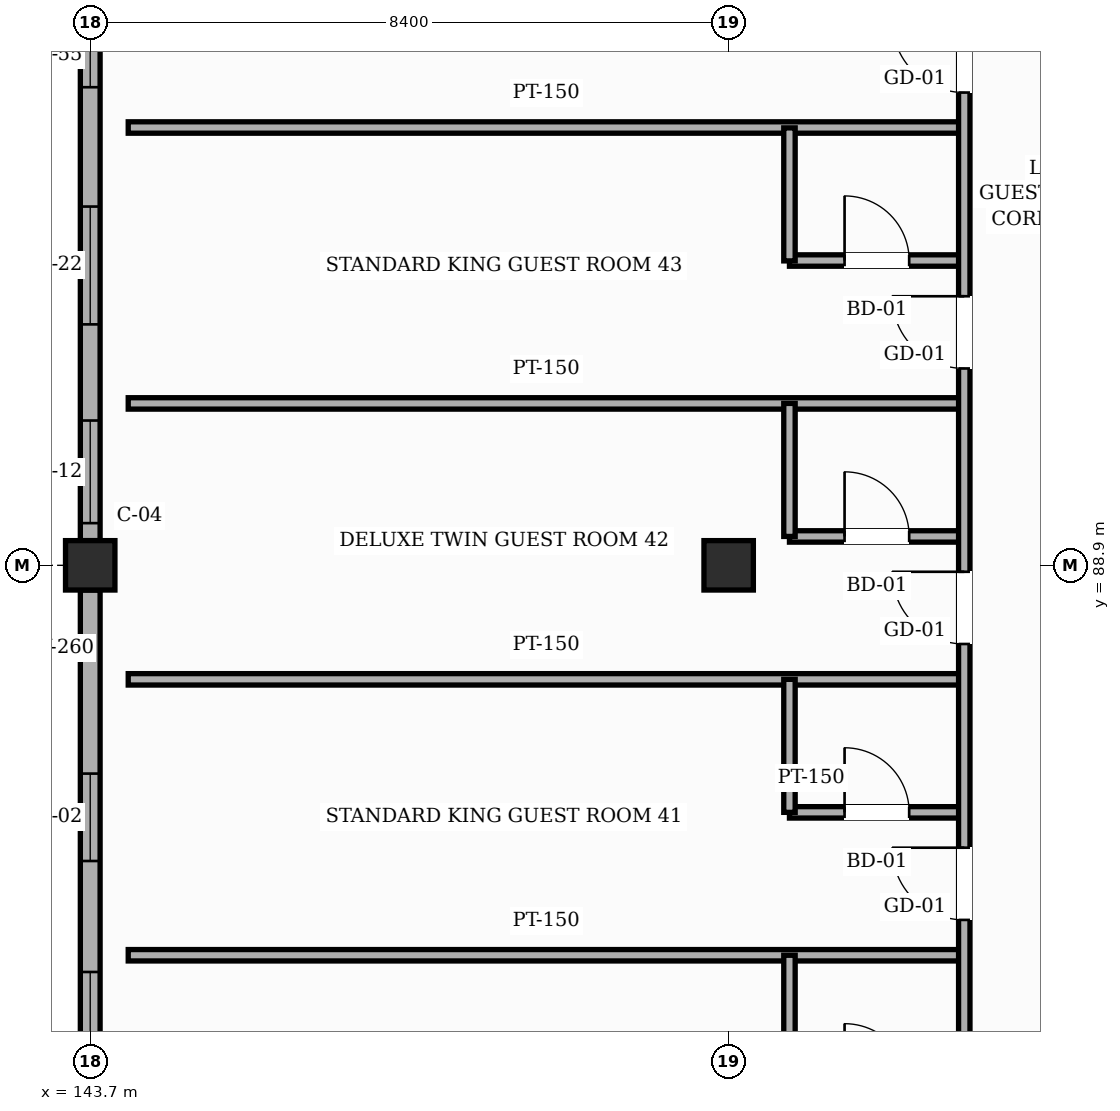
"""IFC4 building model, lengths in metres.
Left out: names, types, materials, properties, quantities, classifications, styles, units other than length and angle.
Written with IfcOpenShell. Run it as: python <this file> out.ifc"""

import sys

from ifc_helpers import new_model, si_unit, direction, frame, frame_2d, origin, origin_2d, place, context, subcontext, project, spatial, rectangle, hollow_rectangle, extrude, element, fill, save


model = new_model("IFC4")
c1 = context("Model", 3, precision=1e-05, world=origin(), true_north=direction((0.0, 1.0)))
c2 = subcontext(c1, "Body", "Model", "MODEL_VIEW")
j1 = project(units=[si_unit("LENGTHUNIT", "METRE"), si_unit("PLANEANGLEUNIT", "RADIAN")], contexts=[c1])
p1 = place(None, origin())
s1 = spatial("IfcSite", under=j1, at=p1, CompositionType="ELEMENT")
p2 = place(p1, origin())
s2 = spatial("IfcBuilding", under=s1, at=p2, CompositionType="ELEMENT")
p3 = place(p2, frame((0.0, 0.0, 19.8)))
s3 = spatial("IfcBuildingStorey", under=s2, at=p3, CompositionType="ELEMENT", Elevation=19.8)
p4 = place(p3, frame((143.7, 88.9, 0.0), z_axis=(0.0, 0.0, 1.0), x_axis=(1.0, 0.0, 0.0)))
e1 = element("IfcColumn", 1, at=p4, inside=s3, PredefinedType="COLUMN", context=c2, shape_type="SweptSolid", body=[
    extrude(hollow_rectangle(XDim=0.65, YDim=0.65, WallThickness=0.025, InnerFilletRadius=0.025, OuterFilletRadius=0.05, at=origin_2d()), origin(), (0.0, 0.0, 1.0), 4.8),
])
p5 = place(p3, frame((152.1, 88.9, -0.24), z_axis=(0.0, 0.0, 1.0), x_axis=(1.0, 0.0, 0.0)))
e2 = element("IfcColumn", 2, at=p5, inside=s3, PredefinedType="COLUMN", context=c2, shape_type="SweptSolid", body=[
    extrude(hollow_rectangle(XDim=0.65, YDim=0.65, WallThickness=0.025, InnerFilletRadius=0.025, OuterFilletRadius=0.05, at=origin_2d()), origin(), (0.0, 0.0, 1.0), 5.04),
])
p6 = place(p3, frame((143.7, 81.225, 0.0), z_axis=(0.0, 0.0, 1.0), x_axis=(0.0, 1.0, 0.0)))
e3 = element("IfcWall", 3, at=p6, inside=s3, PredefinedType="SOLIDWALL", context=c2, shape_type="SweptSolid", body=[
    extrude(rectangle(XDim=7.35, YDim=0.26, at=frame_2d((3.675, 0.0))), origin(), (0.0, 0.0, 1.0), 4.005),
])
p7 = place(p6, frame((0.225, 0.0, 0.85)))
e4 = element("IfcOpeningElement", 4, at=p7, cuts=e3, PredefinedType="OPENING", context=c2, shape_type="SweptSolid", body=[
    extrude(rectangle(XDim=2.1, YDim=1.35, at=frame_2d((1.05, 0.675))), frame((0.0, 0.14, 0.0), z_axis=(0.0, -1.0, 0.0), x_axis=(1.0, 0.0, 0.0)), (0.0, 0.0, 1.0), 0.28),
])
p8 = place(p6, frame((3.785, 0.0, 0.85)))
e5 = element("IfcOpeningElement", 5, at=p8, cuts=e3, PredefinedType="OPENING", context=c2, shape_type="SweptSolid", body=[
    extrude(rectangle(XDim=1.15, YDim=1.5, at=frame_2d((0.575, 0.75))), frame((0.0, 0.14, 0.0), z_axis=(0.0, -1.0, 0.0), x_axis=(1.0, 0.0, 0.0)), (0.0, 0.0, 1.0), 0.28),
])
p9 = place(p3, frame((143.7, 89.225, 0.0), z_axis=(0.0, 0.0, 1.0), x_axis=(0.0, 1.0, 0.0)))
e6 = element("IfcWall", 6, at=p9, inside=s3, PredefinedType="SOLIDWALL", context=c2, shape_type="SweptSolid", body=[
    extrude(rectangle(XDim=7.35, YDim=0.26, at=frame_2d((3.675, 0.0))), origin(), (0.0, 0.0, 1.0), 4.005),
])
p10 = place(p9, frame((0.23, 0.0, 0.85)))
e7 = element("IfcOpeningElement", 7, at=p10, cuts=e6, PredefinedType="OPENING", context=c2, shape_type="SweptSolid", body=[
    extrude(rectangle(XDim=1.35, YDim=1.5, at=frame_2d((0.675, 0.75))), frame((0.0, 0.14, 0.0), z_axis=(0.0, -1.0, 0.0), x_axis=(1.0, 0.0, 0.0)), (0.0, 0.0, 1.0), 0.28),
])
p11 = place(p9, frame((2.845, 0.0, 0.85)))
e8 = element("IfcOpeningElement", 8, at=p11, cuts=e6, PredefinedType="OPENING", context=c2, shape_type="SweptSolid", body=[
    extrude(rectangle(XDim=1.55, YDim=1.5, at=frame_2d((0.775, 0.75))), frame((0.0, 0.14, 0.0), z_axis=(0.0, -1.0, 0.0), x_axis=(1.0, 0.0, 0.0)), (0.0, 0.0, 1.0), 0.28),
])
p12 = place(p9, frame((5.965, 0.0, 0.85)))
e9 = element("IfcOpeningElement", 9, at=p12, cuts=e6, PredefinedType="OPENING", context=c2, shape_type="SweptSolid", body=[
    extrude(rectangle(XDim=0.85, YDim=1.35, at=frame_2d((0.425, 0.675))), frame((0.0, 0.14, 0.0), z_axis=(0.0, -1.0, 0.0), x_axis=(1.0, 0.0, 0.0)), (0.0, 0.0, 1.0), 0.28),
])
p13 = place(p3, frame((144.2, 83.77, 0.0), z_axis=(0.0, 0.0, 1.0), x_axis=(1.0, 0.0, 0.0)))
e10 = element("IfcWall", 10, at=p13, inside=s3, PredefinedType="PARTITIONING", context=c2, shape_type="SweptSolid", body=[
    extrude(rectangle(XDim=11.0, YDim=0.15, at=frame_2d((5.5, 0.0))), origin(), (0.0, 0.0, 1.0), 4.565),
])
p14 = place(p3, frame((152.9, 85.65, 0.0), z_axis=(0.0, 0.0, 1.0), x_axis=(1.0, 0.0, 0.0)))
e11 = element("IfcWall", 11, at=p14, inside=s3, PredefinedType="PARTITIONING", context=c2, shape_type="SweptSolid", body=[
    extrude(rectangle(XDim=2.3, YDim=0.15, at=frame_2d((1.15, 0.0))), origin(), (0.0, 0.0, 1.0), 4.565),
])
p15 = place(p14, frame((0.725, 0.0, 0.0)))
e12 = element("IfcOpeningElement", 12, at=p15, cuts=e11, PredefinedType="OPENING", context=c2, shape_type="SweptSolid", body=[
    extrude(rectangle(XDim=0.85, YDim=2.1, at=frame_2d((0.425, 1.05))), frame((0.0, 0.085, 0.0), z_axis=(0.0, -1.0, 0.0), x_axis=(1.0, 0.0, 0.0)), (0.0, 0.0, 1.0), 0.17),
])
p16 = place(p3, frame((144.2, 87.4, 0.0), z_axis=(0.0, 0.0, 1.0), x_axis=(1.0, 0.0, 0.0)))
e13 = element("IfcWall", 13, at=p16, inside=s3, PredefinedType="PARTITIONING", context=c2, shape_type="SweptSolid", body=[
    extrude(rectangle(XDim=11.0, YDim=0.15, at=frame_2d((5.5, 0.0))), origin(), (0.0, 0.0, 1.0), 4.565),
])
p17 = place(p3, frame((152.9, 89.28, 0.0), z_axis=(0.0, 0.0, 1.0), x_axis=(1.0, 0.0, 0.0)))
e14 = element("IfcWall", 14, at=p17, inside=s3, PredefinedType="PARTITIONING", context=c2, shape_type="SweptSolid", body=[
    extrude(rectangle(XDim=2.3, YDim=0.15, at=frame_2d((1.15, 0.0))), origin(), (0.0, 0.0, 1.0), 4.565),
])
p18 = place(p17, frame((0.725, 0.0, 0.0)))
e15 = element("IfcOpeningElement", 15, at=p18, cuts=e14, PredefinedType="OPENING", context=c2, shape_type="SweptSolid", body=[
    extrude(rectangle(XDim=0.85, YDim=2.1, at=frame_2d((0.425, 1.05))), frame((0.0, 0.085, 0.0), z_axis=(0.0, -1.0, 0.0), x_axis=(1.0, 0.0, 0.0)), (0.0, 0.0, 1.0), 0.17),
])
p19 = place(p3, frame((144.2, 91.03, 0.0), z_axis=(0.0, 0.0, 1.0), x_axis=(1.0, 0.0, 0.0)))
e16 = element("IfcWall", 16, at=p19, inside=s3, PredefinedType="PARTITIONING", context=c2, shape_type="SweptSolid", body=[
    extrude(rectangle(XDim=11.0, YDim=0.15, at=frame_2d((5.5, 0.0))), origin(), (0.0, 0.0, 1.0), 4.565),
])
p20 = place(p3, frame((152.9, 92.91, 0.0), z_axis=(0.0, 0.0, 1.0), x_axis=(1.0, 0.0, 0.0)))
e17 = element("IfcWall", 17, at=p20, inside=s3, PredefinedType="PARTITIONING", context=c2, shape_type="SweptSolid", body=[
    extrude(rectangle(XDim=2.3, YDim=0.15, at=frame_2d((1.15, 0.0))), origin(), (0.0, 0.0, 1.0), 4.205),
])
p21 = place(p20, frame((0.725, 0.0, 0.0)))
e18 = element("IfcOpeningElement", 18, at=p21, cuts=e17, PredefinedType="OPENING", context=c2, shape_type="SweptSolid", body=[
    extrude(rectangle(XDim=0.85, YDim=2.1, at=frame_2d((0.425, 1.05))), frame((0.0, 0.085, 0.0), z_axis=(0.0, -1.0, 0.0), x_axis=(1.0, 0.0, 0.0)), (0.0, 0.0, 1.0), 0.17),
])
p22 = place(p3, frame((144.2, 94.66, 0.0), z_axis=(0.0, 0.0, 1.0), x_axis=(1.0, 0.0, 0.0)))
e19 = element("IfcWall", 19, at=p22, inside=s3, PredefinedType="PARTITIONING", context=c2, shape_type="SweptSolid", body=[
    extrude(rectangle(XDim=11.0, YDim=0.15, at=frame_2d((5.5, 0.0))), origin(), (0.0, 0.0, 1.0), 4.565),
])
for number, where, z_axis, x_axis in (
    (20, (152.9, 82.02, 0.0), (0.0, 0.0, 1.0), (0.0, 1.0, 0.0)),
    (21, (152.9, 85.65, 0.0), (0.0, 0.0, 1.0), (0.0, 1.0, 0.0)),
    (22, (152.9, 89.28, 0.0), (0.0, 0.0, 1.0), (0.0, 1.0, 0.0)),
    (23, (152.9, 92.905, 0.0), (0.0, 0.0, 1.0), (0.0, 1.0, 0.0)),
):
    element("IfcWall", number, at=place(p3, frame(where, z_axis=z_axis, x_axis=x_axis)), inside=s3, PredefinedType="PARTITIONING", context=c2, shape_type="SweptSolid", body=[
        extrude(rectangle(XDim=1.75, YDim=0.15, at=frame_2d((0.875, 0.0))), origin(), (0.0, 0.0, 1.0), 4.565),
    ])
p23 = place(p3, frame((155.2, 62.0, 0.0), z_axis=(0.0, 0.0, 1.0), x_axis=(0.0, 1.0, 0.0)))
e24 = element("IfcWall", 24, at=p23, inside=s3, PredefinedType="PARTITIONING", context=c2, shape_type="SweptSolid", body=[
    extrude(rectangle(XDim=50.8, YDim=0.15, at=frame_2d((25.4, 0.0))), origin(), (0.0, 0.0, 1.0), 4.565),
])
p24 = place(p23, frame((0.465, 0.0, 0.0)))
e25 = element("IfcOpeningElement", 25, at=p24, cuts=e24, PredefinedType="OPENING", context=c2, shape_type="SweptSolid", body=[
    extrude(rectangle(XDim=0.95, YDim=2.15, at=frame_2d((0.475, 1.075))), frame((0.0, 0.085, 0.0), z_axis=(0.0, -1.0, 0.0), x_axis=(1.0, 0.0, 0.0)), (0.0, 0.0, 1.0), 0.17),
])
p25 = place(p23, frame((4.09, 0.0, 0.0)))
e26 = element("IfcOpeningElement", 26, at=p25, cuts=e24, PredefinedType="OPENING", context=c2, shape_type="SweptSolid", body=[
    extrude(rectangle(XDim=0.95, YDim=2.15, at=frame_2d((0.475, 1.075))), frame((0.0, 0.085, 0.0), z_axis=(0.0, -1.0, 0.0), x_axis=(1.0, 0.0, 0.0)), (0.0, 0.0, 1.0), 0.17),
])
p26 = place(p23, frame((7.72, 0.0, 0.0)))
e27 = element("IfcOpeningElement", 27, at=p26, cuts=e24, PredefinedType="OPENING", context=c2, shape_type="SweptSolid", body=[
    extrude(rectangle(XDim=0.95, YDim=2.15, at=frame_2d((0.475, 1.075))), frame((0.0, 0.085, 0.0), z_axis=(0.0, -1.0, 0.0), x_axis=(1.0, 0.0, 0.0)), (0.0, 0.0, 1.0), 0.17),
])
p27 = place(p23, frame((11.35, 0.0, 0.0)))
e28 = element("IfcOpeningElement", 28, at=p27, cuts=e24, PredefinedType="OPENING", context=c2, shape_type="SweptSolid", body=[
    extrude(rectangle(XDim=0.95, YDim=2.15, at=frame_2d((0.475, 1.075))), frame((0.0, 0.085, 0.0), z_axis=(0.0, -1.0, 0.0), x_axis=(1.0, 0.0, 0.0)), (0.0, 0.0, 1.0), 0.17),
])
p28 = place(p23, frame((14.98, 0.0, 0.0)))
e29 = element("IfcOpeningElement", 29, at=p28, cuts=e24, PredefinedType="OPENING", context=c2, shape_type="SweptSolid", body=[
    extrude(rectangle(XDim=0.95, YDim=2.15, at=frame_2d((0.475, 1.075))), frame((0.0, 0.085, 0.0), z_axis=(0.0, -1.0, 0.0), x_axis=(1.0, 0.0, 0.0)), (0.0, 0.0, 1.0), 0.17),
])
p29 = place(p23, frame((18.61, 0.0, 0.0)))
e30 = element("IfcOpeningElement", 30, at=p29, cuts=e24, PredefinedType="OPENING", context=c2, shape_type="SweptSolid", body=[
    extrude(rectangle(XDim=0.95, YDim=2.15, at=frame_2d((0.475, 1.075))), frame((0.0, 0.085, 0.0), z_axis=(0.0, -1.0, 0.0), x_axis=(1.0, 0.0, 0.0)), (0.0, 0.0, 1.0), 0.17),
])
p30 = place(p23, frame((22.235, 0.0, 0.0)))
e31 = element("IfcOpeningElement", 31, at=p30, cuts=e24, PredefinedType="OPENING", context=c2, shape_type="SweptSolid", body=[
    extrude(rectangle(XDim=0.95, YDim=2.15, at=frame_2d((0.475, 1.075))), frame((0.0, 0.085, 0.0), z_axis=(0.0, -1.0, 0.0), x_axis=(1.0, 0.0, 0.0)), (0.0, 0.0, 1.0), 0.17),
])
p31 = place(p23, frame((25.865, 0.0, 0.0)))
e32 = element("IfcOpeningElement", 32, at=p31, cuts=e24, PredefinedType="OPENING", context=c2, shape_type="SweptSolid", body=[
    extrude(rectangle(XDim=0.95, YDim=2.15, at=frame_2d((0.475, 1.075))), frame((0.0, 0.085, 0.0), z_axis=(0.0, -1.0, 0.0), x_axis=(1.0, 0.0, 0.0)), (0.0, 0.0, 1.0), 0.17),
])
p32 = place(p23, frame((29.49, 0.0, 0.0)))
e33 = element("IfcOpeningElement", 33, at=p32, cuts=e24, PredefinedType="OPENING", context=c2, shape_type="SweptSolid", body=[
    extrude(rectangle(XDim=0.95, YDim=2.15, at=frame_2d((0.475, 1.075))), frame((0.0, 0.085, 0.0), z_axis=(0.0, -1.0, 0.0), x_axis=(1.0, 0.0, 0.0)), (0.0, 0.0, 1.0), 0.17),
])
p33 = place(p23, frame((33.12, 0.0, 0.0)))
e34 = element("IfcOpeningElement", 34, at=p33, cuts=e24, PredefinedType="OPENING", context=c2, shape_type="SweptSolid", body=[
    extrude(rectangle(XDim=0.95, YDim=2.15, at=frame_2d((0.475, 1.075))), frame((0.0, 0.085, 0.0), z_axis=(0.0, -1.0, 0.0), x_axis=(1.0, 0.0, 0.0)), (0.0, 0.0, 1.0), 0.17),
])
p34 = place(p23, frame((36.75, 0.0, 0.0)))
e35 = element("IfcOpeningElement", 35, at=p34, cuts=e24, PredefinedType="OPENING", context=c2, shape_type="SweptSolid", body=[
    extrude(rectangle(XDim=0.95, YDim=2.15, at=frame_2d((0.475, 1.075))), frame((0.0, 0.085, 0.0), z_axis=(0.0, -1.0, 0.0), x_axis=(1.0, 0.0, 0.0)), (0.0, 0.0, 1.0), 0.17),
])
p35 = place(p23, frame((40.38, 0.0, 0.0)))
e36 = element("IfcOpeningElement", 36, at=p35, cuts=e24, PredefinedType="OPENING", context=c2, shape_type="SweptSolid", body=[
    extrude(rectangle(XDim=0.95, YDim=2.15, at=frame_2d((0.475, 1.075))), frame((0.0, 0.085, 0.0), z_axis=(0.0, -1.0, 0.0), x_axis=(1.0, 0.0, 0.0)), (0.0, 0.0, 1.0), 0.17),
])
p36 = place(p23, frame((44.01, 0.0, 0.0)))
e37 = element("IfcOpeningElement", 37, at=p36, cuts=e24, PredefinedType="OPENING", context=c2, shape_type="SweptSolid", body=[
    extrude(rectangle(XDim=0.95, YDim=2.15, at=frame_2d((0.475, 1.075))), frame((0.0, 0.085, 0.0), z_axis=(0.0, -1.0, 0.0), x_axis=(1.0, 0.0, 0.0)), (0.0, 0.0, 1.0), 0.17),
])
p37 = place(p23, frame((47.635, 0.0, 0.0)))
e38 = element("IfcOpeningElement", 38, at=p37, cuts=e24, PredefinedType="OPENING", context=c2, shape_type="SweptSolid", body=[
    extrude(rectangle(XDim=0.95, YDim=2.15, at=frame_2d((0.475, 1.075))), frame((0.0, 0.085, 0.0), z_axis=(0.0, -1.0, 0.0), x_axis=(1.0, 0.0, 0.0)), (0.0, 0.0, 1.0), 0.17),
])
p38 = place(p7, origin())
e39 = element("IfcWindow", 39, at=p38, inside=s3, PartitioningType="SINGLE_PANEL", PredefinedType="WINDOW", context=c2, shape_type="SweptSolid", body=[
    extrude(rectangle(XDim=2.1, YDim=1.35, at=frame_2d((1.05, 0.675))), frame((0.0, 0.03, 0.0), z_axis=(0.0, -1.0, 0.0), x_axis=(1.0, 0.0, 0.0)), (0.0, 0.0, 1.0), 0.06),
])
fill(e4, e39)
p39 = place(p8, origin())
e40 = element("IfcWindow", 40, at=p39, inside=s3, PartitioningType="SINGLE_PANEL", PredefinedType="WINDOW", context=c2, shape_type="SweptSolid", body=[
    extrude(rectangle(XDim=1.15, YDim=1.5, at=frame_2d((0.575, 0.75))), frame((0.0, 0.03, 0.0), z_axis=(0.0, -1.0, 0.0), x_axis=(1.0, 0.0, 0.0)), (0.0, 0.0, 1.0), 0.06),
])
fill(e5, e40)
p40 = place(p10, origin())
e41 = element("IfcWindow", 41, at=p40, inside=s3, PartitioningType="SINGLE_PANEL", PredefinedType="WINDOW", context=c2, shape_type="SweptSolid", body=[
    extrude(rectangle(XDim=1.35, YDim=1.5, at=frame_2d((0.675, 0.75))), frame((0.0, 0.03, 0.0), z_axis=(0.0, -1.0, 0.0), x_axis=(1.0, 0.0, 0.0)), (0.0, 0.0, 1.0), 0.06),
])
fill(e7, e41)
p41 = place(p11, origin())
e42 = element("IfcWindow", 42, at=p41, inside=s3, PartitioningType="SINGLE_PANEL", PredefinedType="WINDOW", context=c2, shape_type="SweptSolid", body=[
    extrude(rectangle(XDim=1.55, YDim=1.5, at=frame_2d((0.775, 0.75))), frame((0.0, 0.03, 0.0), z_axis=(0.0, -1.0, 0.0), x_axis=(1.0, 0.0, 0.0)), (0.0, 0.0, 1.0), 0.06),
])
fill(e8, e42)
p42 = place(p12, origin())
e43 = element("IfcWindow", 43, at=p42, inside=s3, PartitioningType="SINGLE_PANEL", PredefinedType="WINDOW", context=c2, shape_type="SweptSolid", body=[
    extrude(rectangle(XDim=0.85, YDim=1.35, at=frame_2d((0.425, 0.675))), frame((0.0, 0.03, 0.0), z_axis=(0.0, -1.0, 0.0), x_axis=(1.0, 0.0, 0.0)), (0.0, 0.0, 1.0), 0.06),
])
fill(e9, e43)
p43 = place(p30, origin())
e44 = element("IfcDoor", 44, at=p43, inside=s3, OperationType="SINGLE_SWING_RIGHT", PredefinedType="DOOR", context=c2, shape_type="SweptSolid", body=[
    extrude(rectangle(XDim=0.95, YDim=2.15, at=frame_2d((0.475, 1.075))), frame((0.0, 0.025, 0.0), z_axis=(0.0, -1.0, 0.0), x_axis=(1.0, 0.0, 0.0)), (0.0, 0.0, 1.0), 0.05),
])
fill(e31, e44)
p44 = place(p15, origin())
e45 = element("IfcDoor", 45, at=p44, inside=s3, OperationType="SINGLE_SWING_LEFT", PredefinedType="DOOR", context=c2, shape_type="SweptSolid", body=[
    extrude(rectangle(XDim=0.85, YDim=2.1, at=frame_2d((0.425, 1.05))), frame((0.0, 0.025, 0.0), z_axis=(0.0, -1.0, 0.0), x_axis=(1.0, 0.0, 0.0)), (0.0, 0.0, 1.0), 0.05),
])
fill(e12, e45)
p45 = place(p31, origin())
e46 = element("IfcDoor", 46, at=p45, inside=s3, OperationType="SINGLE_SWING_RIGHT", PredefinedType="DOOR", context=c2, shape_type="SweptSolid", body=[
    extrude(rectangle(XDim=0.95, YDim=2.15, at=frame_2d((0.475, 1.075))), frame((0.0, 0.025, 0.0), z_axis=(0.0, -1.0, 0.0), x_axis=(1.0, 0.0, 0.0)), (0.0, 0.0, 1.0), 0.05),
])
fill(e32, e46)
p46 = place(p18, origin())
e47 = element("IfcDoor", 47, at=p46, inside=s3, OperationType="SINGLE_SWING_LEFT", PredefinedType="DOOR", context=c2, shape_type="SweptSolid", body=[
    extrude(rectangle(XDim=0.85, YDim=2.1, at=frame_2d((0.425, 1.05))), frame((0.0, 0.025, 0.0), z_axis=(0.0, -1.0, 0.0), x_axis=(1.0, 0.0, 0.0)), (0.0, 0.0, 1.0), 0.05),
])
fill(e15, e47)
p47 = place(p32, origin())
e48 = element("IfcDoor", 48, at=p47, inside=s3, OperationType="SINGLE_SWING_RIGHT", PredefinedType="DOOR", context=c2, shape_type="SweptSolid", body=[
    extrude(rectangle(XDim=0.95, YDim=2.15, at=frame_2d((0.475, 1.075))), frame((0.0, 0.025, 0.0), z_axis=(0.0, -1.0, 0.0), x_axis=(1.0, 0.0, 0.0)), (0.0, 0.0, 1.0), 0.05),
])
fill(e33, e48)
p48 = place(p21, origin())
e49 = element("IfcDoor", 49, at=p48, inside=s3, OperationType="SINGLE_SWING_LEFT", PredefinedType="DOOR", context=c2, shape_type="SweptSolid", body=[
    extrude(rectangle(XDim=0.85, YDim=2.1, at=frame_2d((0.425, 1.05))), frame((0.0, 0.025, 0.0), z_axis=(0.0, -1.0, 0.0), x_axis=(1.0, 0.0, 0.0)), (0.0, 0.0, 1.0), 0.05),
])
fill(e18, e49)
p49 = place(p33, origin())
e50 = element("IfcDoor", 50, at=p49, inside=s3, OperationType="SINGLE_SWING_RIGHT", PredefinedType="DOOR", context=c2, shape_type="SweptSolid", body=[
    extrude(rectangle(XDim=0.95, YDim=2.15, at=frame_2d((0.475, 1.075))), frame((0.0, 0.025, 0.0), z_axis=(0.0, -1.0, 0.0), x_axis=(1.0, 0.0, 0.0)), (0.0, 0.0, 1.0), 0.05),
])
fill(e34, e50)
save(model, sys.argv[1])
